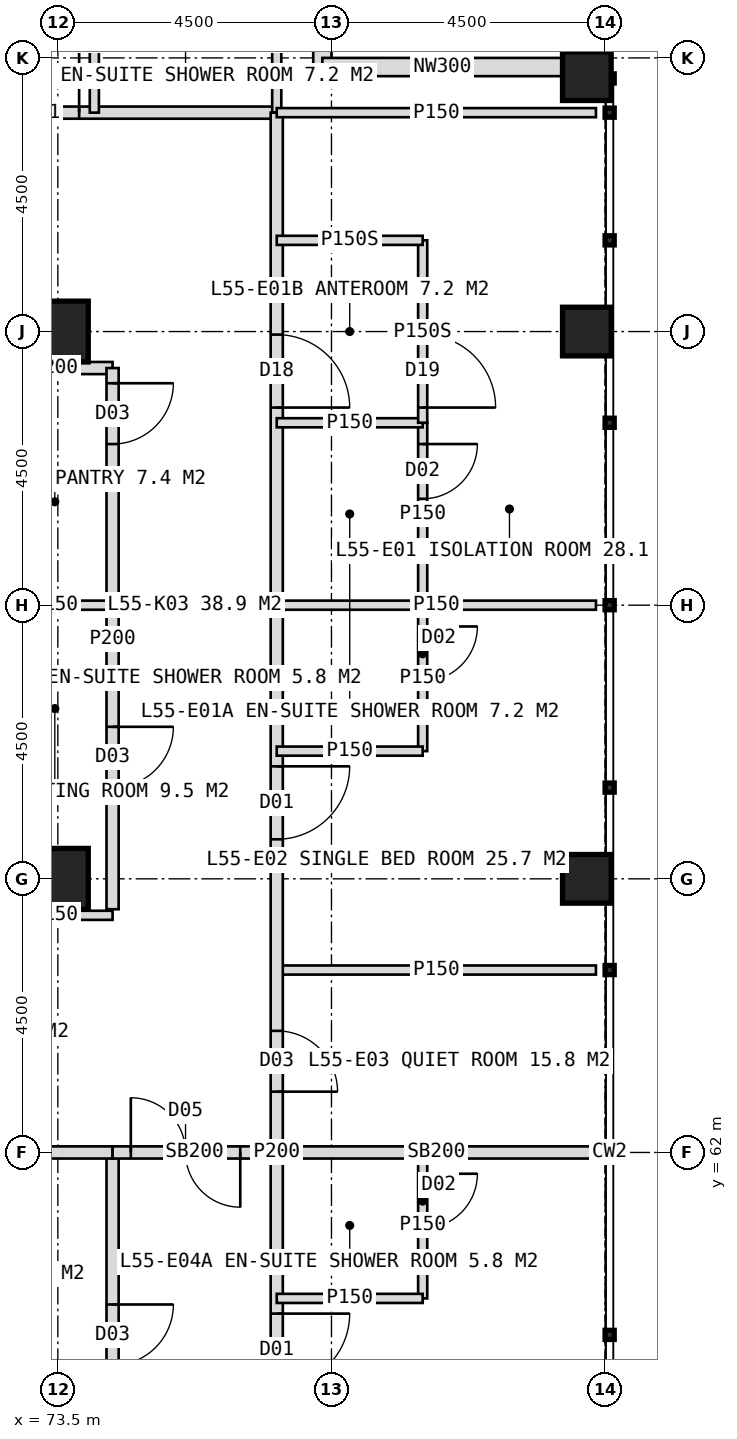
"""IFC4 building model, lengths in metres.
Left out: names, types, materials, properties, quantities, classifications, styles, units other than length and angle.
Written with IfcOpenShell. Run it as: python <this file> out.ifc"""

import sys

from ifc_helpers import new_model, si_unit, direction, frame, frame_2d, origin, origin_2d, place, context, subcontext, project, spatial, rectangle, hollow_rectangle, extrude, element, fill, save


model = new_model("IFC4")
c1 = context("Model", 3, precision=1e-05, world=origin(), true_north=direction((0.0, 1.0)))
c2 = subcontext(c1, "Body", "Model", "MODEL_VIEW")
j1 = project(units=[si_unit("LENGTHUNIT", "METRE"), si_unit("PLANEANGLEUNIT", "RADIAN")], contexts=[c1])
p1 = place(None, origin())
s1 = spatial("IfcSite", under=j1, at=p1, CompositionType="ELEMENT")
p2 = place(p1, origin())
s2 = spatial("IfcBuilding", under=s1, at=p2, CompositionType="ELEMENT")
p3 = place(p2, frame((0.0, 0.0, 229.0)))
s3 = spatial("IfcBuildingStorey", under=s2, at=p3, CompositionType="ELEMENT", Elevation=229.0)
for number, where, z_axis, x_axis in (
    (1, (73.5, 75.5, 0.0), (0.0, 0.0, 1.0), (1.0, 0.0, 0.0)),
    (2, (73.5, 66.5, 0.0), (0.0, 0.0, 1.0), (1.0, 0.0, 0.0)),
):
    element("IfcColumn", number, at=place(p3, frame(where, z_axis=z_axis, x_axis=x_axis)), inside=s3, PredefinedType="COLUMN", context=c2, shape_type="SweptSolid", body=[
        extrude(hollow_rectangle(XDim=1.0, YDim=1.0, WallThickness=0.1, at=origin_2d()), origin(), (0.0, 0.0, 1.0), 4.0),
    ])
for number, where, z_axis, x_axis in (
    (3, (82.2, 66.5, 0.0), (0.0, 0.0, 1.0), (1.0, 0.0, 0.0)),
    (4, (82.2, 75.5, 0.0), (0.0, 0.0, 1.0), (1.0, 0.0, 0.0)),
    (5, (82.2, 79.7, 0.0), (0.0, 0.0, 1.0), (1.0, 0.0, 0.0)),
):
    element("IfcColumn", number, at=place(p3, frame(where, z_axis=z_axis, x_axis=x_axis)), inside=s3, PredefinedType="COLUMN", context=c2, shape_type="SweptSolid", body=[
        extrude(hollow_rectangle(XDim=0.8, YDim=0.8, WallThickness=0.08, at=origin_2d()), origin(), (0.0, 0.0, 1.0), 4.0),
    ])
for number, where, z_axis, x_axis in (
    (6, (77.85, 83.8, 0.0), (0.0, 0.0, 1.0), (0.0, -1.0, 0.0)),
    (7, (77.85, 79.85, 0.0), (0.0, 0.0, 1.0), (1.0, 0.0, 0.0)),
):
    element("IfcWall", number, at=place(p3, frame(where, z_axis=z_axis, x_axis=x_axis)), inside=s3, PredefinedType="ELEMENTEDWALL", context=c2, shape_type="SweptSolid", body=[
        extrude(rectangle(XDim=3.95, YDim=0.3, at=frame_2d((1.975, 0.0))), origin(), (0.0, 0.0, 1.0), 2.85),
    ])
p4 = place(p3, frame((42.9, 79.1, 0.0), z_axis=(0.0, 0.0, 1.0), x_axis=(1.0, 0.0, 0.0)))
e8 = element("IfcWall", 8, at=p4, inside=s3, PredefinedType="PARTITIONING", context=c2, shape_type="SweptSolid", body=[
    extrude(rectangle(XDim=34.2, YDim=0.2, at=frame_2d((17.1, 0.0))), origin(), (0.0, 0.0, 1.0), 3.75),
])
p5 = place(p4, frame((3.55, 0.0, 0.0)))
e9 = element("IfcOpeningElement", 9, at=p5, cuts=e8, PredefinedType="OPENING", context=c2, shape_type="SweptSolid", body=[
    extrude(rectangle(XDim=1.0, YDim=2.1, at=frame_2d((0.5, 1.05))), frame((0.0, 0.11, 0.0), z_axis=(0.0, -1.0, 0.0), x_axis=(1.0, 0.0, 0.0)), (0.0, 0.0, 1.0), 0.22),
])
p6 = place(p4, frame((10.75, 0.0, 0.0)))
e10 = element("IfcOpeningElement", 10, at=p6, cuts=e8, PredefinedType="OPENING", context=c2, shape_type="SweptSolid", body=[
    extrude(rectangle(XDim=1.2, YDim=2.2, at=frame_2d((0.6, 1.1))), frame((0.0, 0.11, 0.0), z_axis=(0.0, -1.0, 0.0), x_axis=(1.0, 0.0, 0.0)), (0.0, 0.0, 1.0), 0.22),
])
p7 = place(p4, frame((16.25, 0.0, 0.0)))
e11 = element("IfcOpeningElement", 11, at=p7, cuts=e8, PredefinedType="OPENING", context=c2, shape_type="SweptSolid", body=[
    extrude(rectangle(XDim=1.2, YDim=2.2, at=frame_2d((0.6, 1.1))), frame((0.0, 0.11, 0.0), z_axis=(0.0, -1.0, 0.0), x_axis=(1.0, 0.0, 0.0)), (0.0, 0.0, 1.0), 0.22),
])
p8 = place(p4, frame((22.75, 0.0, 0.0)))
e12 = element("IfcOpeningElement", 12, at=p8, cuts=e8, PredefinedType="OPENING", context=c2, shape_type="SweptSolid", body=[
    extrude(rectangle(XDim=1.2, YDim=2.2, at=frame_2d((0.6, 1.1))), frame((0.0, 0.11, 0.0), z_axis=(0.0, -1.0, 0.0), x_axis=(1.0, 0.0, 0.0)), (0.0, 0.0, 1.0), 0.22),
])
p9 = place(p4, frame((29.75, 0.0, 0.0)))
e13 = element("IfcOpeningElement", 13, at=p9, cuts=e8, PredefinedType="OPENING", context=c2, shape_type="SweptSolid", body=[
    extrude(rectangle(XDim=1.2, YDim=2.2, at=frame_2d((0.6, 1.1))), frame((0.0, 0.11, 0.0), z_axis=(0.0, -1.0, 0.0), x_axis=(1.0, 0.0, 0.0)), (0.0, 0.0, 1.0), 0.22),
])
for number, where, z_axis, x_axis in (
    (14, (74.1, 79.1, 0.0), (0.0, 0.0, 1.0), (0.0, 1.0, 0.0)),
    (15, (77.1, 79.1, 0.0), (0.0, 0.0, 1.0), (0.0, 1.0, 0.0)),
):
    element("IfcWall", number, at=place(p3, frame(where, z_axis=z_axis, x_axis=x_axis)), inside=s3, PredefinedType="PARTITIONING", context=c2, shape_type="SweptSolid", body=[
        extrude(rectangle(XDim=2.4, YDim=0.15, at=frame_2d((1.2, 0.0))), origin(), (0.0, 0.0, 1.0), 3.75),
    ])
p10 = place(p3, frame((72.5, 74.9, 0.0), z_axis=(0.0, 0.0, 1.0), x_axis=(1.0, 0.0, 0.0)))
e16 = element("IfcWall", 16, at=p10, inside=s3, PredefinedType="PARTITIONING", context=c2, shape_type="SweptSolid", body=[
    extrude(rectangle(XDim=1.9, YDim=0.2, at=frame_2d((0.95, 0.0))), origin(), (0.0, 0.0, 1.0), 3.75),
])
for number, where, z_axis, x_axis in (
    (17, (77.1, 71.0, 0.0), (0.0, 0.0, 1.0), (1.0, 0.0, 0.0)),
    (18, (77.1, 65.0, 0.0), (0.0, 0.0, 1.0), (1.0, 0.0, 0.0)),
):
    element("IfcWall", number, at=place(p3, frame(where, z_axis=z_axis, x_axis=x_axis)), inside=s3, PredefinedType="PARTITIONING", context=c2, shape_type="SweptSolid", body=[
        extrude(rectangle(XDim=5.25, YDim=0.15, at=frame_2d((2.625, 0.0))), origin(), (0.0, 0.0, 1.0), 3.75),
    ])
p11 = place(p3, frame((77.1, 62.0, 0.0), z_axis=(0.0, 0.0, 1.0), x_axis=(1.0, 0.0, 0.0)))
e19 = element("IfcWall", 19, at=p11, inside=s3, PredefinedType="SOLIDWALL", context=c2, shape_type="SweptSolid", body=[
    extrude(rectangle(XDim=5.25, YDim=0.2, at=frame_2d((2.625, 0.0))), origin(), (0.0, 0.0, 1.0), 2.95),
])
p12 = place(p3, frame((77.1, 79.1, 0.0), z_axis=(0.0, 0.0, 1.0), x_axis=(0.0, -1.0, 0.0)))
e20 = element("IfcWall", 20, at=p12, inside=s3, PredefinedType="PARTITIONING", context=c2, shape_type="SweptSolid", body=[
    extrude(rectangle(XDim=34.2, YDim=0.2, at=frame_2d((17.1, 0.0))), origin(), (0.0, 0.0, 1.0), 3.75),
])
p13 = place(p12, frame((3.65, 0.0, 0.0)))
e21 = element("IfcOpeningElement", 21, at=p13, cuts=e20, PredefinedType="OPENING", context=c2, shape_type="SweptSolid", body=[
    extrude(rectangle(XDim=1.2, YDim=2.2, at=frame_2d((0.6, 1.1))), frame((0.0, 0.11, 0.0), z_axis=(0.0, -1.0, 0.0), x_axis=(1.0, 0.0, 0.0)), (0.0, 0.0, 1.0), 0.22),
])
p14 = place(p12, frame((10.75, 0.0, 0.0)))
e22 = element("IfcOpeningElement", 22, at=p14, cuts=e20, PredefinedType="OPENING", context=c2, shape_type="SweptSolid", body=[
    extrude(rectangle(XDim=1.2, YDim=2.2, at=frame_2d((0.6, 1.1))), frame((0.0, 0.11, 0.0), z_axis=(0.0, -1.0, 0.0), x_axis=(1.0, 0.0, 0.0)), (0.0, 0.0, 1.0), 0.22),
])
p15 = place(p12, frame((15.1, 0.0, 0.0)))
e23 = element("IfcOpeningElement", 23, at=p15, cuts=e20, PredefinedType="OPENING", context=c2, shape_type="SweptSolid", body=[
    extrude(rectangle(XDim=1.0, YDim=2.1, at=frame_2d((0.5, 1.05))), frame((0.0, 0.11, 0.0), z_axis=(0.0, -1.0, 0.0), x_axis=(1.0, 0.0, 0.0)), (0.0, 0.0, 1.0), 0.22),
])
p16 = place(p12, frame((19.75, 0.0, 0.0)))
e24 = element("IfcOpeningElement", 24, at=p16, cuts=e20, PredefinedType="OPENING", context=c2, shape_type="SweptSolid", body=[
    extrude(rectangle(XDim=1.2, YDim=2.2, at=frame_2d((0.6, 1.1))), frame((0.0, 0.11, 0.0), z_axis=(0.0, -1.0, 0.0), x_axis=(1.0, 0.0, 0.0)), (0.0, 0.0, 1.0), 0.22),
])
p17 = place(p12, frame((30.35, 0.0, 0.0)))
e25 = element("IfcOpeningElement", 25, at=p17, cuts=e20, PredefinedType="OPENING", context=c2, shape_type="SweptSolid", body=[
    extrude(rectangle(XDim=1.2, YDim=2.2, at=frame_2d((0.6, 1.1))), frame((0.0, 0.11, 0.0), z_axis=(0.0, -1.0, 0.0), x_axis=(1.0, 0.0, 0.0)), (0.0, 0.0, 1.0), 0.22),
])
p18 = place(p3, frame((77.1, 79.1, 0.0), z_axis=(0.0, 0.0, 1.0), x_axis=(1.0, 0.0, 0.0)))
e26 = element("IfcWall", 26, at=p18, inside=s3, PredefinedType="PARTITIONING", context=c2, shape_type="SweptSolid", body=[
    extrude(rectangle(XDim=5.25, YDim=0.15, at=frame_2d((2.625, 0.0))), origin(), (0.0, 0.0, 1.0), 3.75),
])
p19 = place(p3, frame((79.5, 74.0, 0.0), z_axis=(0.0, 0.0, 1.0), x_axis=(0.0, -1.0, 0.0)))
e27 = element("IfcWall", 27, at=p19, inside=s3, PredefinedType="PARTITIONING", context=c2, shape_type="SweptSolid", body=[
    extrude(rectangle(XDim=3.0, YDim=0.15, at=frame_2d((1.5, 0.0))), origin(), (0.0, 0.0, 1.0), 3.75),
])
p20 = place(p19, frame((0.35, 0.0, 0.0)))
e28 = element("IfcOpeningElement", 28, at=p20, cuts=e27, PredefinedType="OPENING", context=c2, shape_type="SweptSolid", body=[
    extrude(rectangle(XDim=0.9, YDim=2.1, at=frame_2d((0.45, 1.05))), frame((0.0, 0.085, 0.0), z_axis=(0.0, -1.0, 0.0), x_axis=(1.0, 0.0, 0.0)), (0.0, 0.0, 1.0), 0.17),
])
p21 = place(p3, frame((77.1, 74.0, 0.0), z_axis=(0.0, 0.0, 1.0), x_axis=(1.0, 0.0, 0.0)))
e29 = element("IfcWall", 29, at=p21, inside=s3, PredefinedType="PARTITIONING", context=c2, shape_type="SweptSolid", body=[
    extrude(rectangle(XDim=2.4, YDim=0.15, at=frame_2d((1.2, 0.0))), origin(), (0.0, 0.0, 1.0), 3.75),
])
p22 = place(p3, frame((79.5, 77.0, 0.0), z_axis=(0.0, 0.0, 1.0), x_axis=(0.0, -1.0, 0.0)))
e30 = element("IfcWall", 30, at=p22, inside=s3, PredefinedType="PARTITIONING", context=c2, shape_type="SweptSolid", body=[
    extrude(rectangle(XDim=3.0, YDim=0.15, at=frame_2d((1.5, 0.0))), origin(), (0.0, 0.0, 1.0), 3.75),
])
p23 = place(p22, frame((1.55, 0.0, 0.0)))
e31 = element("IfcOpeningElement", 31, at=p23, cuts=e30, PredefinedType="OPENING", context=c2, shape_type="SweptSolid", body=[
    extrude(rectangle(XDim=1.2, YDim=2.2, at=frame_2d((0.6, 1.1))), frame((0.0, 0.085, 0.0), z_axis=(0.0, -1.0, 0.0), x_axis=(1.0, 0.0, 0.0)), (0.0, 0.0, 1.0), 0.17),
])
p24 = place(p3, frame((77.1, 77.0, 0.0), z_axis=(0.0, 0.0, 1.0), x_axis=(1.0, 0.0, 0.0)))
e32 = element("IfcWall", 32, at=p24, inside=s3, PredefinedType="PARTITIONING", context=c2, shape_type="SweptSolid", body=[
    extrude(rectangle(XDim=2.4, YDim=0.15, at=frame_2d((1.2, 0.0))), origin(), (0.0, 0.0, 1.0), 3.75),
])
p25 = place(p3, frame((79.5, 71.0, 0.0), z_axis=(0.0, 0.0, 1.0), x_axis=(0.0, -1.0, 0.0)))
e33 = element("IfcWall", 33, at=p25, inside=s3, PredefinedType="PARTITIONING", context=c2, shape_type="SweptSolid", body=[
    extrude(rectangle(XDim=2.4, YDim=0.15, at=frame_2d((1.2, 0.0))), origin(), (0.0, 0.0, 1.0), 3.75),
])
p26 = place(p25, frame((0.35, 0.0, 0.0)))
e34 = element("IfcOpeningElement", 34, at=p26, cuts=e33, PredefinedType="OPENING", context=c2, shape_type="SweptSolid", body=[
    extrude(rectangle(XDim=0.9, YDim=2.1, at=frame_2d((0.45, 1.05))), frame((0.0, 0.085, 0.0), z_axis=(0.0, -1.0, 0.0), x_axis=(1.0, 0.0, 0.0)), (0.0, 0.0, 1.0), 0.17),
])
p27 = place(p3, frame((77.1, 68.6, 0.0), z_axis=(0.0, 0.0, 1.0), x_axis=(1.0, 0.0, 0.0)))
e35 = element("IfcWall", 35, at=p27, inside=s3, PredefinedType="PARTITIONING", context=c2, shape_type="SweptSolid", body=[
    extrude(rectangle(XDim=2.4, YDim=0.15, at=frame_2d((1.2, 0.0))), origin(), (0.0, 0.0, 1.0), 3.75),
])
p28 = place(p3, frame((79.5, 62.0, 0.0), z_axis=(0.0, 0.0, 1.0), x_axis=(0.0, -1.0, 0.0)))
e36 = element("IfcWall", 36, at=p28, inside=s3, PredefinedType="PARTITIONING", context=c2, shape_type="SweptSolid", body=[
    extrude(rectangle(XDim=2.4, YDim=0.15, at=frame_2d((1.2, 0.0))), origin(), (0.0, 0.0, 1.0), 3.75),
])
p29 = place(p28, frame((0.35, 0.0, 0.0)))
e37 = element("IfcOpeningElement", 37, at=p29, cuts=e36, PredefinedType="OPENING", context=c2, shape_type="SweptSolid", body=[
    extrude(rectangle(XDim=0.9, YDim=2.1, at=frame_2d((0.45, 1.05))), frame((0.0, 0.085, 0.0), z_axis=(0.0, -1.0, 0.0), x_axis=(1.0, 0.0, 0.0)), (0.0, 0.0, 1.0), 0.17),
])
p30 = place(p3, frame((77.1, 59.6, 0.0), z_axis=(0.0, 0.0, 1.0), x_axis=(1.0, 0.0, 0.0)))
e38 = element("IfcWall", 38, at=p30, inside=s3, PredefinedType="PARTITIONING", context=c2, shape_type="SweptSolid", body=[
    extrude(rectangle(XDim=2.4, YDim=0.15, at=frame_2d((1.2, 0.0))), origin(), (0.0, 0.0, 1.0), 3.75),
])
p31 = place(p3, frame((72.5, 71.0, 0.0), z_axis=(0.0, 0.0, 1.0), x_axis=(1.0, 0.0, 0.0)))
e39 = element("IfcWall", 39, at=p31, inside=s3, PredefinedType="PARTITIONING", context=c2, shape_type="SweptSolid", body=[
    extrude(rectangle(XDim=1.9, YDim=0.15, at=frame_2d((0.95, 0.0))), origin(), (0.0, 0.0, 1.0), 3.75),
])
p32 = place(p3, frame((74.4, 74.9, 0.0), z_axis=(0.0, 0.0, 1.0), x_axis=(0.0, -1.0, 0.0)))
e40 = element("IfcWall", 40, at=p32, inside=s3, PredefinedType="PARTITIONING", context=c2, shape_type="SweptSolid", body=[
    extrude(rectangle(XDim=8.9, YDim=0.2, at=frame_2d((4.45, 0.0))), origin(), (0.0, 0.0, 1.0), 3.75),
])
p33 = place(p32, frame((0.25, 0.0, 0.0)))
e41 = element("IfcOpeningElement", 41, at=p33, cuts=e40, PredefinedType="OPENING", context=c2, shape_type="SweptSolid", body=[
    extrude(rectangle(XDim=1.0, YDim=2.1, at=frame_2d((0.5, 1.05))), frame((0.0, 0.11, 0.0), z_axis=(0.0, -1.0, 0.0), x_axis=(1.0, 0.0, 0.0)), (0.0, 0.0, 1.0), 0.22),
])
p34 = place(p32, frame((5.9, 0.0, 0.0)))
e42 = element("IfcOpeningElement", 42, at=p34, cuts=e40, PredefinedType="OPENING", context=c2, shape_type="SweptSolid", body=[
    extrude(rectangle(XDim=1.0, YDim=2.1, at=frame_2d((0.5, 1.05))), frame((0.0, 0.11, 0.0), z_axis=(0.0, -1.0, 0.0), x_axis=(1.0, 0.0, 0.0)), (0.0, 0.0, 1.0), 0.22),
])
p35 = place(p3, frame((74.4, 62.0, 0.0), z_axis=(0.0, 0.0, 1.0), x_axis=(0.0, -1.0, 0.0)))
e43 = element("IfcWall", 43, at=p35, inside=s3, PredefinedType="PARTITIONING", context=c2, shape_type="SweptSolid", body=[
    extrude(rectangle(XDim=14.4, YDim=0.2, at=frame_2d((7.2, 0.0))), origin(), (0.0, 0.0, 1.0), 3.75),
])
p36 = place(p35, frame((2.5, 0.0, 0.0)))
e44 = element("IfcOpeningElement", 44, at=p36, cuts=e43, PredefinedType="OPENING", context=c2, shape_type="SweptSolid", body=[
    extrude(rectangle(XDim=1.0, YDim=2.1, at=frame_2d((0.5, 1.05))), frame((0.0, 0.11, 0.0), z_axis=(0.0, -1.0, 0.0), x_axis=(1.0, 0.0, 0.0)), (0.0, 0.0, 1.0), 0.22),
])
p37 = place(p35, frame((7.0, 0.0, 0.0)))
e45 = element("IfcOpeningElement", 45, at=p37, cuts=e43, PredefinedType="OPENING", context=c2, shape_type="SweptSolid", body=[
    extrude(rectangle(XDim=1.0, YDim=2.1, at=frame_2d((0.5, 1.05))), frame((0.0, 0.11, 0.0), z_axis=(0.0, -1.0, 0.0), x_axis=(1.0, 0.0, 0.0)), (0.0, 0.0, 1.0), 0.22),
])
p38 = place(p35, frame((11.2, 0.0, 0.0)))
e46 = element("IfcOpeningElement", 46, at=p38, cuts=e43, PredefinedType="OPENING", context=c2, shape_type="SweptSolid", body=[
    extrude(rectangle(XDim=1.0, YDim=2.1, at=frame_2d((0.5, 1.05))), frame((0.0, 0.11, 0.0), z_axis=(0.0, -1.0, 0.0), x_axis=(1.0, 0.0, 0.0)), (0.0, 0.0, 1.0), 0.22),
])
p39 = place(p3, frame((72.5, 65.9, 0.0), z_axis=(0.0, 0.0, 1.0), x_axis=(1.0, 0.0, 0.0)))
e47 = element("IfcWall", 47, at=p39, inside=s3, PredefinedType="PARTITIONING", context=c2, shape_type="SweptSolid", body=[
    extrude(rectangle(XDim=1.9, YDim=0.15, at=frame_2d((0.95, 0.0))), origin(), (0.0, 0.0, 1.0), 3.75),
])
p40 = place(p3, frame((69.0, 62.0, 0.0), z_axis=(0.0, 0.0, 1.0), x_axis=(1.0, 0.0, 0.0)))
e48 = element("IfcWall", 48, at=p40, inside=s3, PredefinedType="SOLIDWALL", context=c2, shape_type="SweptSolid", body=[
    extrude(rectangle(XDim=5.4, YDim=0.2, at=frame_2d((2.7, 0.0))), origin(), (0.0, 0.0, 1.0), 2.95),
])
p41 = place(p3, frame((74.4, 62.0, 0.0), z_axis=(0.0, 0.0, 1.0), x_axis=(1.0, 0.0, 0.0)))
e49 = element("IfcWall", 49, at=p41, inside=s3, PredefinedType="SOLIDWALL", context=c2, shape_type="SweptSolid", body=[
    extrude(rectangle(XDim=2.7, YDim=0.2, at=frame_2d((1.35, 0.0))), origin(), (0.0, 0.0, 1.0), 2.95),
])
p42 = place(p41, frame((0.3, 0.0, 0.0)))
e50 = element("IfcOpeningElement", 50, at=p42, cuts=e49, PredefinedType="OPENING", context=c2, shape_type="SweptSolid", body=[
    extrude(rectangle(XDim=1.8, YDim=2.2, at=frame_2d((0.9, 1.1))), frame((0.0, 0.11, 0.0), z_axis=(0.0, -1.0, 0.0), x_axis=(1.0, 0.0, 0.0)), (0.0, 0.0, 1.0), 0.22),
])
p43 = place(p9, origin())
e51 = element("IfcDoor", 51, at=p43, inside=s3, OperationType="SINGLE_SWING_RIGHT", PredefinedType="DOOR", context=c2, shape_type="SweptSolid", body=[
    extrude(rectangle(XDim=1.2, YDim=2.2, at=frame_2d((0.6, 1.1))), frame((0.0, 0.025, 0.0), z_axis=(0.0, -1.0, 0.0), x_axis=(1.0, 0.0, 0.0)), (0.0, 0.0, 1.0), 0.05),
])
fill(e13, e51)
p44 = place(p33, origin())
e52 = element("IfcDoor", 52, at=p44, inside=s3, OperationType="SINGLE_SWING_LEFT", PredefinedType="DOOR", context=c2, shape_type="SweptSolid", body=[
    extrude(rectangle(XDim=1.0, YDim=2.1, at=frame_2d((0.5, 1.05))), frame((0.0, 0.025, 0.0), z_axis=(0.0, -1.0, 0.0), x_axis=(1.0, 0.0, 0.0)), (0.0, 0.0, 1.0), 0.05),
])
fill(e41, e52)
p45 = place(p23, origin())
e53 = element("IfcDoor", 53, at=p45, inside=s3, OperationType="SINGLE_SWING_RIGHT", PredefinedType="DOOR", context=c2, shape_type="SweptSolid", body=[
    extrude(rectangle(XDim=1.2, YDim=2.2, at=frame_2d((0.6, 1.1))), frame((0.0, 0.025, 0.0), z_axis=(0.0, -1.0, 0.0), x_axis=(1.0, 0.0, 0.0)), (0.0, 0.0, 1.0), 0.05),
])
fill(e31, e53)
p46 = place(p13, origin())
e54 = element("IfcDoor", 54, at=p46, inside=s3, OperationType="SINGLE_SWING_RIGHT", PredefinedType="DOOR", context=c2, shape_type="SweptSolid", body=[
    extrude(rectangle(XDim=1.2, YDim=2.2, at=frame_2d((0.6, 1.1))), frame((0.0, 0.025, 0.0), z_axis=(0.0, -1.0, 0.0), x_axis=(1.0, 0.0, 0.0)), (0.0, 0.0, 1.0), 0.05),
])
fill(e21, e54)
p47 = place(p20, origin())
e55 = element("IfcDoor", 55, at=p47, inside=s3, OperationType="SINGLE_SWING_LEFT", PredefinedType="DOOR", context=c2, shape_type="SweptSolid", body=[
    extrude(rectangle(XDim=0.9, YDim=2.1, at=frame_2d((0.45, 1.05))), frame((0.0, 0.025, 0.0), z_axis=(0.0, -1.0, 0.0), x_axis=(1.0, 0.0, 0.0)), (0.0, 0.0, 1.0), 0.05),
])
fill(e28, e55)
p48 = place(p14, origin())
e56 = element("IfcDoor", 56, at=p48, inside=s3, OperationType="SINGLE_SWING_LEFT", PredefinedType="DOOR", context=c2, shape_type="SweptSolid", body=[
    extrude(rectangle(XDim=1.2, YDim=2.2, at=frame_2d((0.6, 1.1))), frame((0.0, 0.025, 0.0), z_axis=(0.0, -1.0, 0.0), x_axis=(1.0, 0.0, 0.0)), (0.0, 0.0, 1.0), 0.05),
])
fill(e22, e56)
p49 = place(p26, origin())
e57 = element("IfcDoor", 57, at=p49, inside=s3, OperationType="SINGLE_SWING_LEFT", PredefinedType="DOOR", context=c2, shape_type="SweptSolid", body=[
    extrude(rectangle(XDim=0.9, YDim=2.1, at=frame_2d((0.45, 1.05))), frame((0.0, 0.025, 0.0), z_axis=(0.0, -1.0, 0.0), x_axis=(1.0, 0.0, 0.0)), (0.0, 0.0, 1.0), 0.05),
])
fill(e34, e57)
p50 = place(p15, origin())
e58 = element("IfcDoor", 58, at=p50, inside=s3, OperationType="SINGLE_SWING_RIGHT", PredefinedType="DOOR", context=c2, shape_type="SweptSolid", body=[
    extrude(rectangle(XDim=1.0, YDim=2.1, at=frame_2d((0.5, 1.05))), frame((0.0, 0.025, 0.0), z_axis=(0.0, -1.0, 0.0), x_axis=(1.0, 0.0, 0.0)), (0.0, 0.0, 1.0), 0.05),
])
fill(e23, e58)
p51 = place(p16, origin())
e59 = element("IfcDoor", 59, at=p51, inside=s3, OperationType="SINGLE_SWING_LEFT", PredefinedType="DOOR", context=c2, shape_type="SweptSolid", body=[
    extrude(rectangle(XDim=1.2, YDim=2.2, at=frame_2d((0.6, 1.1))), frame((0.0, 0.025, 0.0), z_axis=(0.0, -1.0, 0.0), x_axis=(1.0, 0.0, 0.0)), (0.0, 0.0, 1.0), 0.05),
])
fill(e24, e59)
p52 = place(p29, origin())
e60 = element("IfcDoor", 60, at=p52, inside=s3, OperationType="SINGLE_SWING_LEFT", PredefinedType="DOOR", context=c2, shape_type="SweptSolid", body=[
    extrude(rectangle(XDim=0.9, YDim=2.1, at=frame_2d((0.45, 1.05))), frame((0.0, 0.025, 0.0), z_axis=(0.0, -1.0, 0.0), x_axis=(1.0, 0.0, 0.0)), (0.0, 0.0, 1.0), 0.05),
])
fill(e37, e60)
p53 = place(p34, origin())
e61 = element("IfcDoor", 61, at=p53, inside=s3, OperationType="SINGLE_SWING_LEFT", PredefinedType="DOOR", context=c2, shape_type="SweptSolid", body=[
    extrude(rectangle(XDim=1.0, YDim=2.1, at=frame_2d((0.5, 1.05))), frame((0.0, 0.025, 0.0), z_axis=(0.0, -1.0, 0.0), x_axis=(1.0, 0.0, 0.0)), (0.0, 0.0, 1.0), 0.05),
])
fill(e42, e61)
p54 = place(p36, origin())
e62 = element("IfcDoor", 62, at=p54, inside=s3, OperationType="SINGLE_SWING_LEFT", PredefinedType="DOOR", context=c2, shape_type="SweptSolid", body=[
    extrude(rectangle(XDim=1.0, YDim=2.1, at=frame_2d((0.5, 1.05))), frame((0.0, 0.025, 0.0), z_axis=(0.0, -1.0, 0.0), x_axis=(1.0, 0.0, 0.0)), (0.0, 0.0, 1.0), 0.05),
])
fill(e44, e62)
p55 = place(p42, origin())
e63 = element("IfcDoor", 63, at=p55, inside=s3, OperationType="DOUBLE_DOOR_DOUBLE_SWING", PredefinedType="DOOR", context=c2, shape_type="SweptSolid", body=[
    extrude(rectangle(XDim=1.8, YDim=2.2, at=frame_2d((0.9, 1.1))), frame((0.0, 0.025, 0.0), z_axis=(0.0, -1.0, 0.0), x_axis=(1.0, 0.0, 0.0)), (0.0, 0.0, 1.0), 0.05),
])
fill(e50, e63)
save(model, sys.argv[1])
